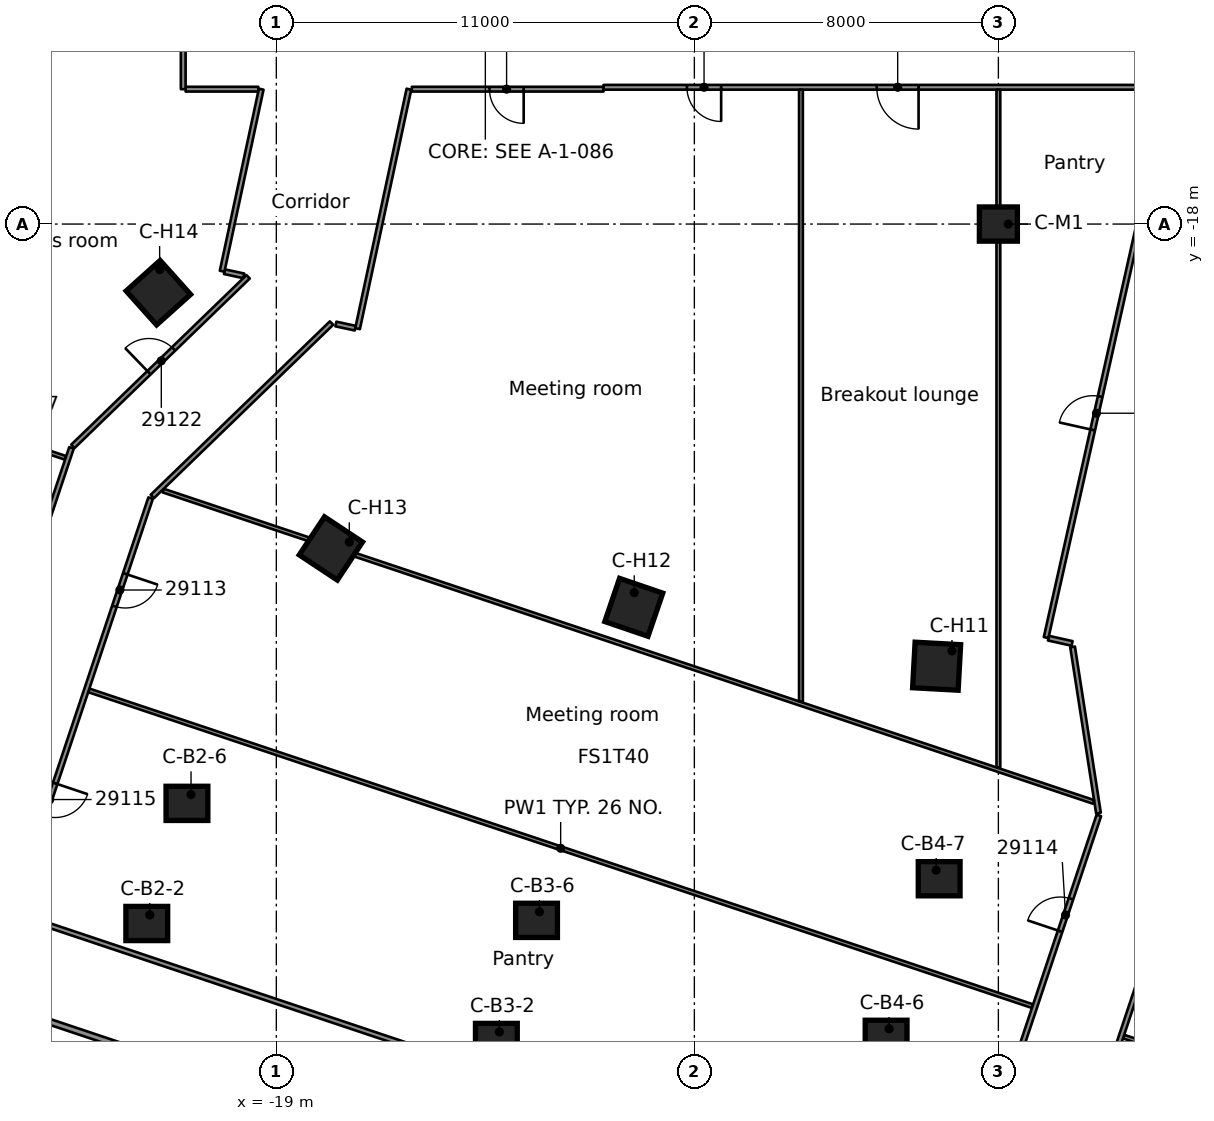
"""IFC4 building model, lengths in metres.
Left out: names, types, materials, properties, quantities, classifications, styles, units other than length and angle.
Written with IfcOpenShell. Run it as: python <this file> out.ifc"""

import sys

from ifc_helpers import new_model, si_unit, direction, frame, frame_2d, origin, origin_2d, place, context, subcontext, project, spatial, rectangle, extrude, element, fill, save


model = new_model("IFC4")
c1 = context("Model", 3, precision=1e-05, world=origin(), true_north=direction((0.0, 1.0)))
c2 = subcontext(c1, "Body", "Model", "MODEL_VIEW")
j1 = project(units=[si_unit("LENGTHUNIT", "METRE"), si_unit("PLANEANGLEUNIT", "RADIAN")], contexts=[c1])
p1 = place(None, origin())
s1 = spatial("IfcSite", under=j1, at=p1, CompositionType="ELEMENT")
p2 = place(p1, origin())
s2 = spatial("IfcBuilding", under=s1, at=p2, CompositionType="ELEMENT")
p3 = place(p2, frame((0.0, 0.0, 149.1)))
s3 = spatial("IfcBuildingStorey", under=s2, at=p3, CompositionType="ELEMENT", Elevation=149.1)
for number, where, z_axis, x_axis in (
    (1, (-22.409, -36.404, 0.0), (0.0, 0.0, 1.0), (1.0, 0.0, 0.0)),
    (2, (-21.352, -33.243, 0.0), (0.0, 0.0, 1.0), (1.0, 0.0, 0.0)),
    (3, (-13.21, -39.482, 0.0), (0.0, 0.0, 1.0), (1.0, 0.0, 0.0)),
    (4, (-12.153, -36.321, 0.0), (0.0, 0.0, 1.0), (1.0, 0.0, 0.0)),
    (5, (-2.954, -39.399, 0.0), (0.0, 0.0, 1.0), (1.0, 0.0, 0.0)),
    (6, (-1.558, -35.226, 0.0), (0.0, 0.0, 1.0), (1.0, 0.0, 0.0)),
):
    element("IfcColumn", number, at=place(p3, frame(where, z_axis=z_axis, x_axis=x_axis)), inside=s3, PredefinedType="COLUMN", context=c2, shape_type="SweptSolid", body=[
        extrude(rectangle(XDim=1.1, YDim=0.9, at=origin_2d()), origin(), (0.0, 0.0, 1.0), 3.5),
    ])
for number, where, z_axis, x_axis in (
    (7, (-1.625, -29.634, 0.0), (0.0, 0.0, 1.0), (-0.055, -0.998, 0.0)),
    (8, (-9.594, -28.085, 0.0), (0.0, 0.0, 1.0), (-0.323, -0.946, 0.0)),
    (9, (-17.564, -26.536, 0.0), (0.0, 0.0, 1.0), (-0.552, -0.834, 0.0)),
    (10, (-22.104, -19.806, 0.0), (0.0, 0.0, 1.0), (-0.745, -0.667, 0.0)),
):
    element("IfcColumn", number, at=place(p3, frame(where, z_axis=z_axis, x_axis=x_axis)), inside=s3, PredefinedType="COLUMN", context=c2, shape_type="SweptSolid", body=[
        extrude(rectangle(XDim=1.2, YDim=1.2, at=origin_2d()), origin(), (0.0, 0.0, 1.0), 3.5),
    ])
p4 = place(p3, frame((0.0, -18.0, 0.0), z_axis=(0.0, 0.0, 1.0), x_axis=(1.0, 0.0, 0.0)))
e11 = element("IfcColumn", 11, at=p4, inside=s3, PredefinedType="COLUMN", context=c2, shape_type="SweptSolid", body=[
    extrude(rectangle(XDim=1.0, YDim=0.9, at=origin_2d()), origin(), (0.0, 0.0, 1.0), 3.5),
])
p5 = place(p3, frame((2.634, -33.497, 0.0), z_axis=(0.0, 0.0, 1.0), x_axis=(-0.153972826204, 0.988075082567, 0.0)))
e12 = element("IfcWall", 12, at=p5, inside=s3, PredefinedType="PARTITIONING", context=c2, shape_type="SweptSolid", body=[
    extrude(rectangle(XDim=4.424, YDim=0.125, at=frame_2d((2.212, 0.0))), origin(), (0.0, 0.0, 1.0), 3.08),
])
p6 = place(p3, frame((-1.841, -46.728, 0.0), z_axis=(0.0, 0.0, 1.0), x_axis=(-0.94832621322, 0.317297011205, 0.0)))
e13 = element("IfcWall", 13, at=p6, inside=s3, PredefinedType="PARTITIONING", context=c2, shape_type="SweptSolid", body=[
    extrude(rectangle(XDim=26.162, YDim=0.15, at=frame_2d((13.081, 0.0))), origin(), (0.0, 0.0, 1.0), 3.08),
])
p7 = place(p6, frame((12.525, 0.0, 0.0)))
e14 = element("IfcOpeningElement", 14, at=p7, cuts=e13, PredefinedType="OPENING", context=c2, shape_type="SweptSolid", body=[
    extrude(rectangle(XDim=0.9, YDim=2.1, at=frame_2d((0.45, 1.05))), frame((0.0, 0.085, 0.0), z_axis=(0.0, -1.0, 0.0), x_axis=(1.0, 0.0, 0.0)), (0.0, 0.0, 1.0), 0.17),
])
p8 = place(p3, frame((-25.901, -36.146, 0.0), z_axis=(0.0, 0.0, 1.0), x_axis=(0.948326561211, -0.317295971139, 0.0)))
e15 = element("IfcWall", 15, at=p8, inside=s3, PredefinedType="PARTITIONING", context=c2, shape_type="SweptSolid", body=[
    extrude(rectangle(XDim=26.187, YDim=0.125, at=frame_2d((13.094, 0.0))), origin(), (0.0, 0.0, 1.0), 3.08),
])
p9 = place(p3, frame((-23.935, -30.27, 0.0), z_axis=(0.0, 0.0, 1.0), x_axis=(0.948326561211, -0.317295971139, 0.0)))
e16 = element("IfcWall", 16, at=p9, inside=s3, PredefinedType="PARTITIONING", context=c2, shape_type="SweptSolid", body=[
    extrude(rectangle(XDim=26.187, YDim=0.1, at=frame_2d((13.094, 0.0))), origin(), (0.0, 0.0, 1.0), 3.08),
])
p10 = place(p3, frame((3.294, -39.38, 0.0), z_axis=(0.0, 0.0, 1.0), x_axis=(0.948260676976, -0.317492816455, 0.0)))
e17 = element("IfcWall", 17, at=p10, inside=s3, PredefinedType="PARTITIONING", context=c2, shape_type="SweptSolid", body=[
    extrude(rectangle(XDim=4.631, YDim=0.1, at=frame_2d((2.315, 0.0))), origin(), (0.0, 0.0, 1.0), 3.08),
])
p11 = place(p3, frame((-28.943, -22.682, 0.0), z_axis=(0.0, 0.0, 1.0), x_axis=(0.948361239818, -0.317192305725, 0.0)))
e18 = element("IfcWall", 18, at=p11, inside=s3, PredefinedType="PARTITIONING", context=c2, shape_type="SweptSolid", body=[
    extrude(rectangle(XDim=4.631, YDim=0.1, at=frame_2d((2.316, 0.0))), origin(), (0.0, 0.0, 1.0), 3.08),
])
p12 = place(p3, frame((-21.98, -25.012, 0.0), z_axis=(0.0, 0.0, 1.0), x_axis=(0.948312916699, -0.317336748614, 0.0)))
e19 = element("IfcWall", 19, at=p12, inside=s3, PredefinedType="PARTITIONING", context=c2, shape_type="SweptSolid", body=[
    extrude(rectangle(XDim=25.818, YDim=0.1, at=frame_2d((12.909, 0.0))), origin(), (0.0, 0.0, 1.0), 3.08),
])
p13 = place(p3, frame((1.317, -28.896, 0.0), z_axis=(0.0, 0.0, 1.0), x_axis=(0.9759612217, -0.217944244563, 0.0)))
e20 = element("IfcWall", 20, at=p13, inside=s3, PredefinedType="PARTITIONING", context=c2, shape_type="SweptSolid", body=[
    extrude(rectangle(XDim=0.637, YDim=0.125, at=frame_2d((0.319, 0.0))), origin(), (0.0, 0.0, 1.0), 3.08),
])
p14 = place(p3, frame((-17.433, -20.63, 0.0), z_axis=(0.0, 0.0, 1.0), x_axis=(0.977781820865, -0.209625167351, 0.0)))
e21 = element("IfcWall", 21, at=p14, inside=s3, PredefinedType="PARTITIONING", context=c2, shape_type="SweptSolid", body=[
    extrude(rectangle(XDim=0.521, YDim=0.125, at=frame_2d((0.26, 0.0))), origin(), (0.0, 0.0, 1.0), 3.08),
])
p15 = place(p3, frame((-20.364, -19.254, 0.0), z_axis=(0.0, 0.0, 1.0), x_axis=(0.977699164018, -0.210010344217, 0.0)))
e22 = element("IfcWall", 22, at=p15, inside=s3, PredefinedType="PARTITIONING", context=c2, shape_type="SweptSolid", body=[
    extrude(rectangle(XDim=0.52, YDim=0.125, at=frame_2d((0.26, 0.0))), origin(), (0.0, 0.0, 1.0), 3.08),
])
p16 = place(p3, frame((-21.387, -14.451, 0.0), z_axis=(0.0, 0.0, 1.0), x_axis=(1.0, 0.0, 0.0)))
e23 = element("IfcWall", 23, at=p16, inside=s3, PredefinedType="PARTITIONING", context=c2, shape_type="SweptSolid", body=[
    extrude(rectangle(XDim=1.912, YDim=0.125, at=frame_2d((0.956, 0.0))), origin(), (0.0, 0.0, 1.0), 3.08),
])
p17 = place(p3, frame((-10.391, -14.451, 0.0), z_axis=(0.0, 0.0, 1.0), x_axis=(-1.0, 0.0, 0.0)))
e24 = element("IfcWall", 24, at=p17, inside=s3, PredefinedType="PARTITIONING", context=c2, shape_type="SweptSolid", body=[
    extrude(rectangle(XDim=5.043, YDim=0.125, at=frame_2d((2.521, 0.0))), origin(), (0.0, 0.0, 1.0), 3.08),
])
p18 = place(p17, frame((2.1, 0.0, 0.0)))
e25 = element("IfcOpeningElement", 25, at=p18, cuts=e24, PredefinedType="OPENING", context=c2, shape_type="SweptSolid", body=[
    extrude(rectangle(XDim=0.9, YDim=2.1, at=frame_2d((0.45, 1.05))), frame((0.0, 0.073, 0.0), z_axis=(0.0, -1.0, 0.0), x_axis=(1.0, 0.0, 0.0)), (0.0, 0.0, 1.0), 0.145),
])
p19 = place(p3, frame((4.427, -14.401, 0.0), z_axis=(0.0, 0.0, 1.0), x_axis=(-1.0, 0.0, 0.0)))
e26 = element("IfcWall", 26, at=p19, inside=s3, PredefinedType="PARTITIONING", context=c2, shape_type="SweptSolid", body=[
    extrude(rectangle(XDim=14.817, YDim=0.125, at=frame_2d((7.408, 0.0))), origin(), (0.0, 0.0, 1.0), 3.08),
])
p20 = place(p19, frame((11.722, 0.0, 0.0)))
e27 = element("IfcOpeningElement", 27, at=p20, cuts=e26, PredefinedType="OPENING", context=c2, shape_type="SweptSolid", body=[
    extrude(rectangle(XDim=0.9, YDim=2.1, at=frame_2d((0.45, 1.05))), frame((0.0, 0.073, 0.0), z_axis=(0.0, -1.0, 0.0), x_axis=(1.0, 0.0, 0.0)), (0.0, 0.0, 1.0), 0.145),
])
p21 = place(p19, frame((6.527, 0.0, 0.0)))
e28 = element("IfcOpeningElement", 28, at=p21, cuts=e26, PredefinedType="OPENING", context=c2, shape_type="SweptSolid", body=[
    extrude(rectangle(XDim=1.1, YDim=2.1, at=frame_2d((0.55, 1.05))), frame((0.0, 0.073, 0.0), z_axis=(0.0, -1.0, 0.0), x_axis=(1.0, 0.0, 0.0)), (0.0, 0.0, 1.0), 0.145),
])
p22 = place(p3, frame((-17.547, -20.605, 0.0), z_axis=(0.0, 0.0, 1.0), x_axis=(-0.718656118165, -0.695365647572, 0.0)))
e29 = element("IfcWall", 29, at=p22, inside=s3, PredefinedType="PARTITIONING", context=c2, shape_type="SweptSolid", body=[
    extrude(rectangle(XDim=6.562, YDim=0.125, at=frame_2d((3.281, 0.0))), origin(), (0.0, 0.0, 1.0), 3.08),
])
p23 = place(p3, frame((-24.354, -23.85, 0.0), z_axis=(0.0, 0.0, 1.0), x_axis=(0.718689835624, 0.695330799095, 0.0)))
e30 = element("IfcWall", 30, at=p23, inside=s3, PredefinedType="PARTITIONING", context=c2, shape_type="SweptSolid", body=[
    extrude(rectangle(XDim=6.417, YDim=0.125, at=frame_2d((3.208, 0.0))), origin(), (0.0, 0.0, 1.0), 3.08),
])
p24 = place(p23, frame((2.788, 0.0, 0.0)))
e31 = element("IfcOpeningElement", 31, at=p24, cuts=e30, PredefinedType="OPENING", context=c2, shape_type="SweptSolid", body=[
    extrude(rectangle(XDim=0.9, YDim=2.1, at=frame_2d((0.45, 1.05))), frame((0.0, 0.073, 0.0), z_axis=(0.0, -1.0, 0.0), x_axis=(1.0, 0.0, 0.0)), (0.0, 0.0, 1.0), 0.145),
])
p25 = place(p3, frame((5.014, -34.047, 0.0), z_axis=(0.0, 0.0, 1.0), x_axis=(-0.317385597106, -0.948296568986, 0.0)))
e32 = element("IfcWall", 32, at=p25, inside=s3, PredefinedType="PARTITIONING", context=c2, shape_type="SweptSolid", body=[
    extrude(rectangle(XDim=18.151, YDim=0.125, at=frame_2d((9.076, 0.0))), origin(), (0.0, 0.0, 1.0), 3.08),
])
p26 = place(p25, frame((2.347, 0.0, 0.0)))
e33 = element("IfcOpeningElement", 33, at=p26, cuts=e32, PredefinedType="OPENING", context=c2, shape_type="SweptSolid", body=[
    extrude(rectangle(XDim=0.9, YDim=2.1, at=frame_2d((0.45, 1.05))), frame((0.0, 0.073, 0.0), z_axis=(0.0, -1.0, 0.0), x_axis=(1.0, 0.0, 0.0)), (0.0, 0.0, 1.0), 0.145),
])
p27 = place(p25, frame((8.203, 0.0, 0.0)))
e34 = element("IfcOpeningElement", 34, at=p27, cuts=e32, PredefinedType="OPENING", context=c2, shape_type="SweptSolid", body=[
    extrude(rectangle(XDim=0.9, YDim=2.1, at=frame_2d((0.45, 1.05))), frame((0.0, 0.073, 0.0), z_axis=(0.0, -1.0, 0.0), x_axis=(1.0, 0.0, 0.0)), (0.0, 0.0, 1.0), 0.145),
])
p28 = place(p3, frame((-1.008, -44.475, 0.0), z_axis=(0.0, 0.0, 1.0), x_axis=(0.317302986419, 0.948324213974, 0.0)))
e35 = element("IfcWall", 35, at=p28, inside=s3, PredefinedType="PARTITIONING", context=c2, shape_type="SweptSolid", body=[
    extrude(rectangle(XDim=11.51, YDim=0.125, at=frame_2d((5.755, 0.0))), origin(), (0.0, 0.0, 1.0), 3.08),
])
p29 = place(p28, frame((8.296, 0.0, 0.0)))
e36 = element("IfcOpeningElement", 36, at=p29, cuts=e35, PredefinedType="OPENING", context=c2, shape_type="SweptSolid", body=[
    extrude(rectangle(XDim=0.9, YDim=2.1, at=frame_2d((0.45, 1.05))), frame((0.0, 0.073, 0.0), z_axis=(0.0, -1.0, 0.0), x_axis=(1.0, 0.0, 0.0)), (0.0, 0.0, 1.0), 0.145),
])
p30 = place(p3, frame((-22.308, -25.211, 0.0), z_axis=(0.0, 0.0, 1.0), x_axis=(-0.317283910316, -0.948330596498, 0.0)))
e37 = element("IfcWall", 37, at=p30, inside=s3, PredefinedType="PARTITIONING", context=c2, shape_type="SweptSolid", body=[
    extrude(rectangle(XDim=11.51, YDim=0.125, at=frame_2d((5.755, 0.0))), origin(), (0.0, 0.0, 1.0), 3.08),
])
p31 = place(p30, frame((2.1, 0.0, 0.0)))
e38 = element("IfcOpeningElement", 38, at=p31, cuts=e37, PredefinedType="OPENING", context=c2, shape_type="SweptSolid", body=[
    extrude(rectangle(XDim=0.9, YDim=2.1, at=frame_2d((0.45, 1.05))), frame((0.0, 0.073, 0.0), z_axis=(0.0, -1.0, 0.0), x_axis=(1.0, 0.0, 0.0)), (0.0, 0.0, 1.0), 0.145),
])
p32 = place(p30, frame((7.914, 0.0, 0.0)))
e39 = element("IfcOpeningElement", 39, at=p32, cuts=e37, PredefinedType="OPENING", context=c2, shape_type="SweptSolid", body=[
    extrude(rectangle(XDim=0.9, YDim=2.1, at=frame_2d((0.45, 1.05))), frame((0.0, 0.073, 0.0), z_axis=(0.0, -1.0, 0.0), x_axis=(1.0, 0.0, 0.0)), (0.0, 0.0, 1.0), 0.145),
])
p33 = place(p3, frame((-30.714, -42.764, 0.0), z_axis=(0.0, 0.0, 1.0), x_axis=(0.317699123241, 0.94819157721, 0.0)))
e40 = element("IfcWall", 40, at=p33, inside=s3, PredefinedType="PARTITIONING", context=c2, shape_type="SweptSolid", body=[
    extrude(rectangle(XDim=19.906, YDim=0.125, at=frame_2d((9.953, 0.0))), origin(), (0.0, 0.0, 1.0), 3.08),
])
p34 = place(p33, frame((16.35, 0.0, 0.0)))
e41 = element("IfcOpeningElement", 41, at=p34, cuts=e40, PredefinedType="OPENING", context=c2, shape_type="SweptSolid", body=[
    extrude(rectangle(XDim=1.0, YDim=2.1, at=frame_2d((0.5, 1.05))), frame((0.0, 0.073, 0.0), z_axis=(0.0, -1.0, 0.0), x_axis=(1.0, 0.0, 0.0)), (0.0, 0.0, 1.0), 0.145),
])
p35 = place(p33, frame((10.403, 0.0, 0.0)))
e42 = element("IfcOpeningElement", 42, at=p35, cuts=e40, PredefinedType="OPENING", context=c2, shape_type="SweptSolid", body=[
    extrude(rectangle(XDim=1.1, YDim=2.1, at=frame_2d((0.55, 1.05))), frame((0.0, 0.073, 0.0), z_axis=(0.0, -1.0, 0.0), x_axis=(1.0, 0.0, 0.0)), (0.0, 0.0, 1.0), 0.145),
])
p36 = place(p3, frame((1.256, -28.881, 0.0), z_axis=(0.0, 0.0, 1.0), x_axis=(0.218920699835, 0.975742654179, 0.0)))
e43 = element("IfcWall", 43, at=p36, inside=s3, PredefinedType="PARTITIONING", context=c2, shape_type="SweptSolid", body=[
    extrude(rectangle(XDim=11.895, YDim=0.125, at=frame_2d((5.947, 0.0))), origin(), (0.0, 0.0, 1.0), 3.08),
])
p37 = place(p36, frame((5.6, 0.0, 0.0)))
e44 = element("IfcOpeningElement", 44, at=p37, cuts=e43, PredefinedType="OPENING", context=c2, shape_type="SweptSolid", body=[
    extrude(rectangle(XDim=0.9, YDim=2.1, at=frame_2d((0.45, 1.05))), frame((0.0, 0.073, 0.0), z_axis=(0.0, -1.0, 0.0), x_axis=(1.0, 0.0, 0.0)), (0.0, 0.0, 1.0), 0.145),
])
p38 = place(p3, frame((-16.862, -20.752, 0.0), z_axis=(0.0, 0.0, 1.0), x_axis=(0.209655863281, 0.977775239506, 0.0)))
e45 = element("IfcWall", 45, at=p38, inside=s3, PredefinedType="PARTITIONING", context=c2, shape_type="SweptSolid", body=[
    extrude(rectangle(XDim=6.444, YDim=0.125, at=frame_2d((3.222, 0.0))), origin(), (0.0, 0.0, 1.0), 3.08),
])
p39 = place(p3, frame((-19.398, -14.451, 0.0), z_axis=(0.0, 0.0, 1.0), x_axis=(-0.209848984455, -0.977733810259, 0.0)))
e46 = element("IfcWall", 46, at=p39, inside=s3, PredefinedType="PARTITIONING", context=c2, shape_type="SweptSolid", body=[
    extrude(rectangle(XDim=4.899, YDim=0.125, at=frame_2d((2.45, 0.0))), origin(), (0.0, 0.0, 1.0), 3.08),
])
p40 = place(p3, frame((0.0, -32.297, 0.0), z_axis=(0.0, 0.0, 1.0), x_axis=(0.0, 1.0, 0.0)))
e47 = element("IfcWall", 47, at=p40, inside=s3, PredefinedType="PARTITIONING", context=c2, shape_type="SweptSolid", body=[
    extrude(rectangle(XDim=17.834, YDim=0.1, at=frame_2d((8.917, 0.0))), origin(), (0.0, 0.0, 1.0), 3.08),
])
p41 = place(p3, frame((-5.195, -30.559, 0.0), z_axis=(0.0, 0.0, 1.0), x_axis=(0.0, 1.0, 0.0)))
e48 = element("IfcWall", 48, at=p41, inside=s3, PredefinedType="PARTITIONING", context=c2, shape_type="SweptSolid", body=[
    extrude(rectangle(XDim=16.096, YDim=0.1, at=frame_2d((8.048, 0.0))), origin(), (0.0, 0.0, 1.0), 3.08),
])
p42 = place(p3, frame((-21.45, -14.451, 0.0), z_axis=(0.0, 0.0, 1.0), x_axis=(0.0, 1.0, 0.0)))
e49 = element("IfcWall", 49, at=p42, inside=s3, PredefinedType="PARTITIONING", context=c2, shape_type="SweptSolid", body=[
    extrude(rectangle(XDim=28.902, YDim=0.125, at=frame_2d((14.451, 0.0))), origin(), (0.0, 0.0, 1.0), 3.08),
])
p43 = place(p42, frame((13.551, 0.0, 0.0)))
e50 = element("IfcOpeningElement", 50, at=p43, cuts=e49, PredefinedType="OPENING", context=c2, shape_type="SweptSolid", body=[
    extrude(rectangle(XDim=1.8, YDim=2.1, at=frame_2d((0.9, 1.05))), frame((0.0, 0.073, 0.0), z_axis=(0.0, -1.0, 0.0), x_axis=(1.0, 0.0, 0.0)), (0.0, 0.0, 1.0), 0.145),
])
p44 = place(p42, frame((27.051, 0.0, 0.0)))
e51 = element("IfcOpeningElement", 51, at=p44, cuts=e49, PredefinedType="OPENING", context=c2, shape_type="SweptSolid", body=[
    extrude(rectangle(XDim=1.1, YDim=2.1, at=frame_2d((0.55, 1.05))), frame((0.0, 0.073, 0.0), z_axis=(0.0, -1.0, 0.0), x_axis=(1.0, 0.0, 0.0)), (0.0, 0.0, 1.0), 0.145),
])
p45 = place(p31, origin())
e52 = element("IfcDoor", 52, at=p45, inside=s3, OperationType="SINGLE_SWING_LEFT", PredefinedType="DOOR", context=c2, shape_type="SweptSolid", body=[
    extrude(rectangle(XDim=0.9, YDim=2.1, at=frame_2d((0.45, 1.05))), frame((0.0, 0.025, 0.0), z_axis=(0.0, -1.0, 0.0), x_axis=(1.0, 0.0, 0.0)), (0.0, 0.0, 1.0), 0.05),
])
fill(e38, e52)
p46 = place(p29, origin())
e53 = element("IfcDoor", 53, at=p46, inside=s3, OperationType="SINGLE_SWING_RIGHT", PredefinedType="DOOR", context=c2, shape_type="SweptSolid", body=[
    extrude(rectangle(XDim=0.9, YDim=2.1, at=frame_2d((0.45, 1.05))), frame((0.0, 0.025, 0.0), z_axis=(0.0, -1.0, 0.0), x_axis=(1.0, 0.0, 0.0)), (0.0, 0.0, 1.0), 0.05),
])
fill(e36, e53)
p47 = place(p32, origin())
e54 = element("IfcDoor", 54, at=p47, inside=s3, OperationType="SINGLE_SWING_RIGHT", PredefinedType="DOOR", context=c2, shape_type="SweptSolid", body=[
    extrude(rectangle(XDim=0.9, YDim=2.1, at=frame_2d((0.45, 1.05))), frame((0.0, 0.025, 0.0), z_axis=(0.0, -1.0, 0.0), x_axis=(1.0, 0.0, 0.0)), (0.0, 0.0, 1.0), 0.05),
])
fill(e39, e54)
p48 = place(p24, origin())
e55 = element("IfcDoor", 55, at=p48, inside=s3, OperationType="SINGLE_SWING_RIGHT", PredefinedType="DOOR", context=c2, shape_type="SweptSolid", body=[
    extrude(rectangle(XDim=0.9, YDim=2.1, at=frame_2d((0.45, 1.05))), frame((0.0, 0.025, 0.0), z_axis=(0.0, -1.0, 0.0), x_axis=(1.0, 0.0, 0.0)), (0.0, 0.0, 1.0), 0.05),
])
fill(e31, e55)
p49 = place(p18, origin())
e56 = element("IfcDoor", 56, at=p49, inside=s3, OperationType="SINGLE_SWING_RIGHT", PredefinedType="DOOR", context=c2, shape_type="SweptSolid", body=[
    extrude(rectangle(XDim=0.9, YDim=2.1, at=frame_2d((0.45, 1.05))), frame((0.0, 0.025, 0.0), z_axis=(0.0, -1.0, 0.0), x_axis=(1.0, 0.0, 0.0)), (0.0, 0.0, 1.0), 0.05),
])
fill(e25, e56)
p50 = place(p20, origin())
e57 = element("IfcDoor", 57, at=p50, inside=s3, OperationType="SINGLE_SWING_RIGHT", PredefinedType="DOOR", context=c2, shape_type="SweptSolid", body=[
    extrude(rectangle(XDim=0.9, YDim=2.1, at=frame_2d((0.45, 1.05))), frame((0.0, 0.025, 0.0), z_axis=(0.0, -1.0, 0.0), x_axis=(1.0, 0.0, 0.0)), (0.0, 0.0, 1.0), 0.05),
])
fill(e27, e57)
p51 = place(p21, origin())
e58 = element("IfcDoor", 58, at=p51, inside=s3, OperationType="SINGLE_SWING_LEFT", PredefinedType="DOOR", context=c2, shape_type="SweptSolid", body=[
    extrude(rectangle(XDim=1.1, YDim=2.1, at=frame_2d((0.55, 1.05))), frame((0.0, 0.025, 0.0), z_axis=(0.0, -1.0, 0.0), x_axis=(1.0, 0.0, 0.0)), (0.0, 0.0, 1.0), 0.05),
])
fill(e28, e58)
p52 = place(p37, origin())
e59 = element("IfcDoor", 59, at=p52, inside=s3, OperationType="SINGLE_SWING_RIGHT", PredefinedType="DOOR", context=c2, shape_type="SweptSolid", body=[
    extrude(rectangle(XDim=0.9, YDim=2.1, at=frame_2d((0.45, 1.05))), frame((0.0, 0.025, 0.0), z_axis=(0.0, -1.0, 0.0), x_axis=(1.0, 0.0, 0.0)), (0.0, 0.0, 1.0), 0.05),
])
fill(e44, e59)
save(model, sys.argv[1])
